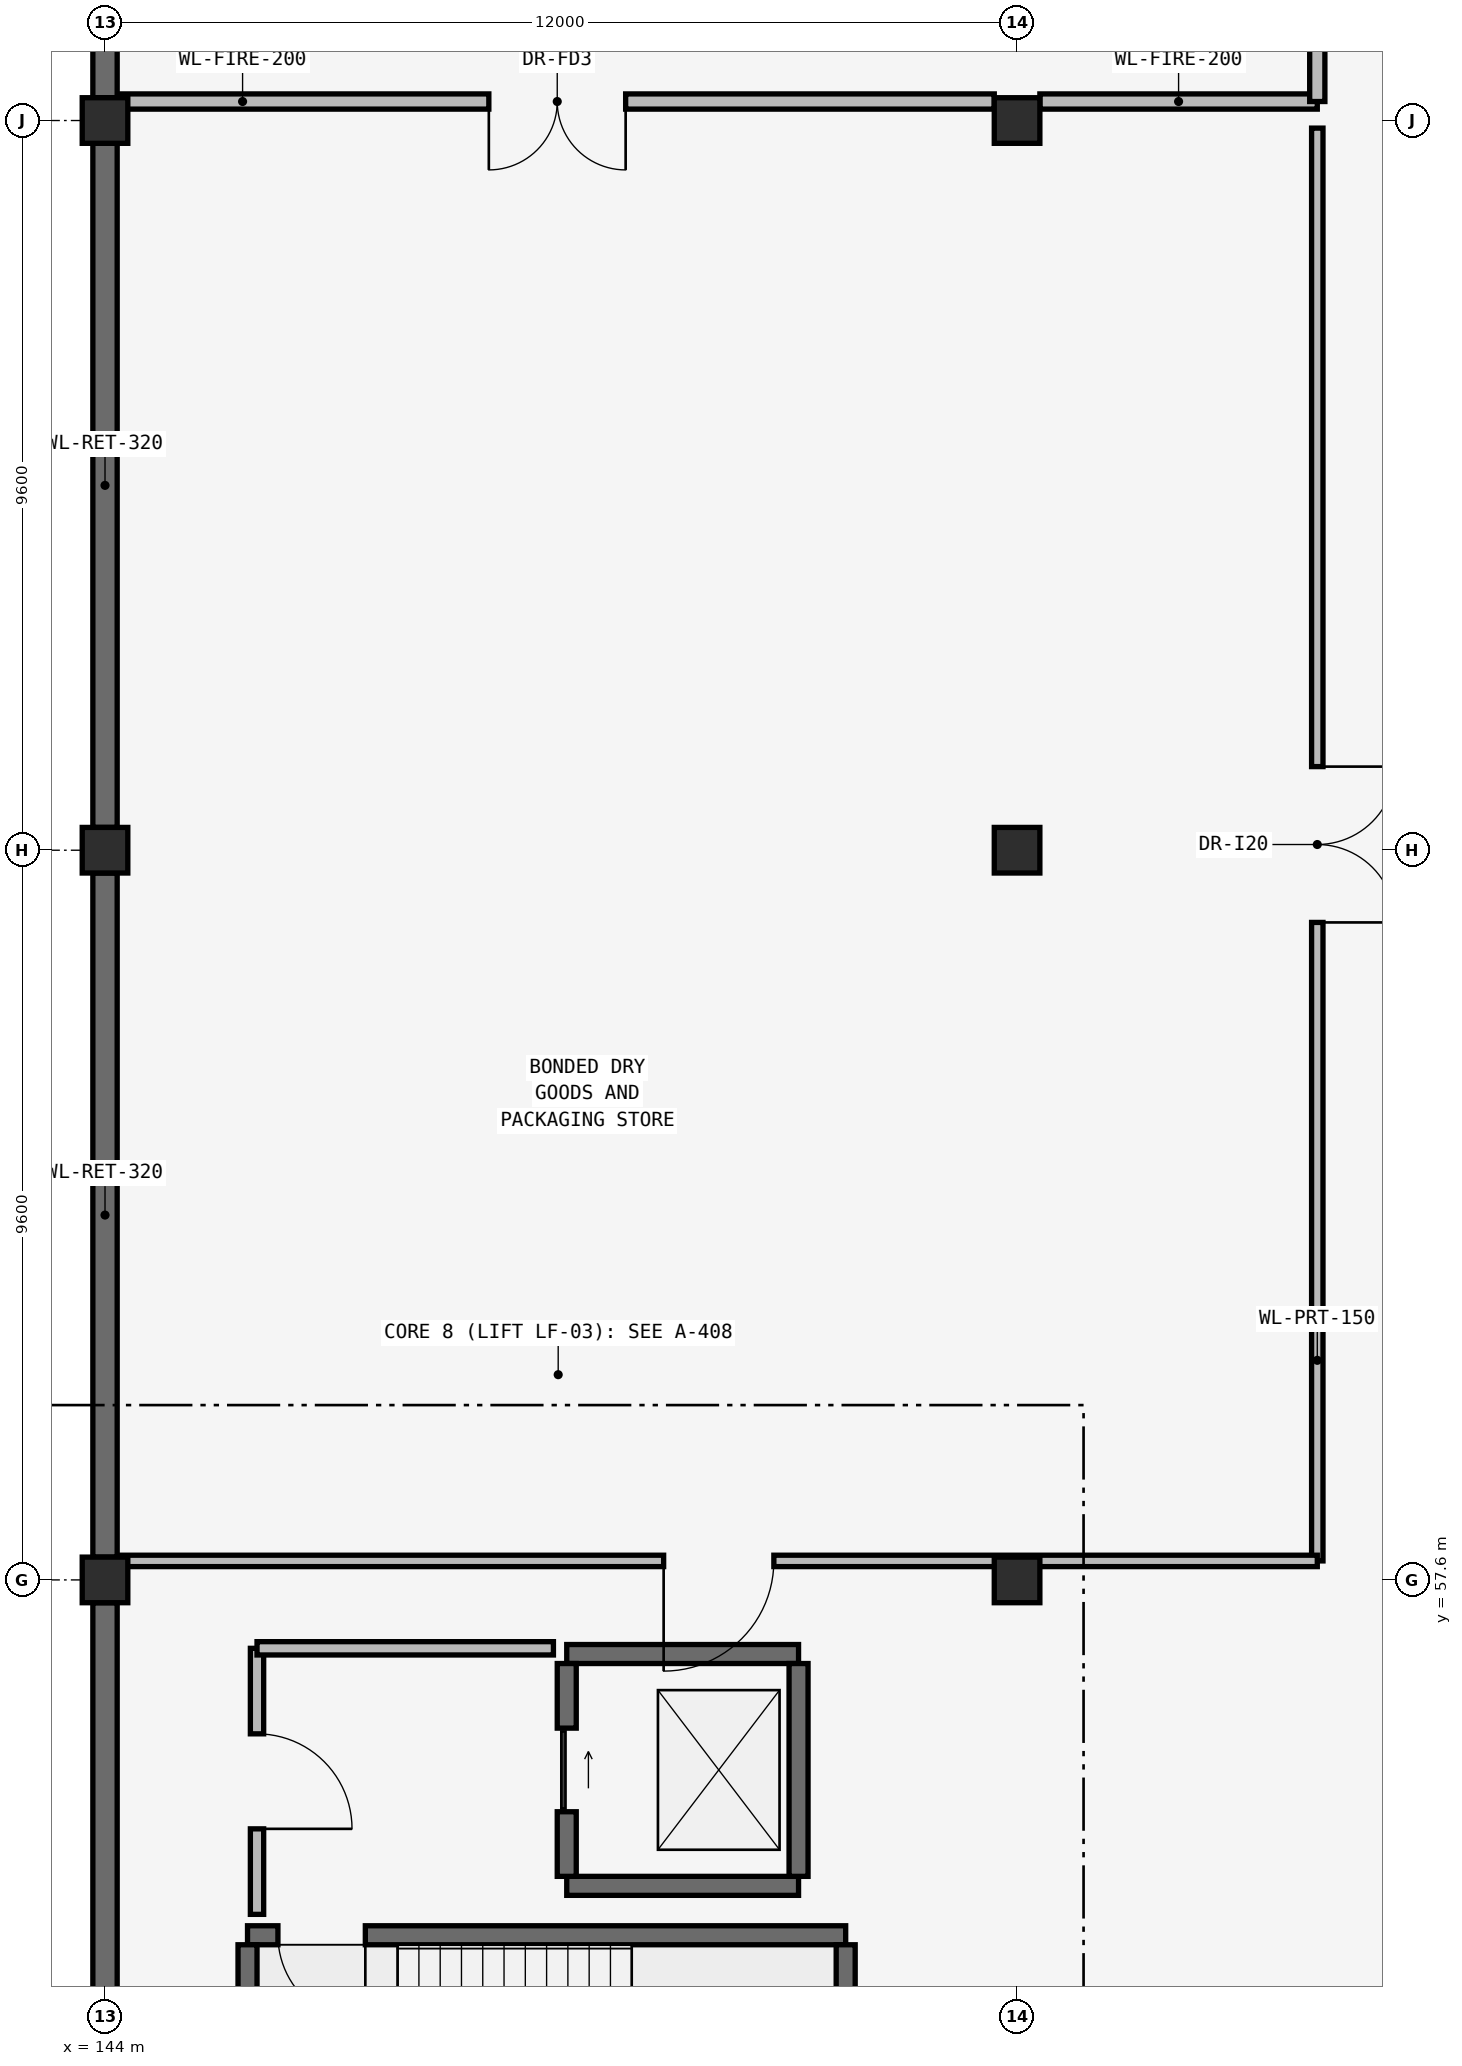
"""IFC4 building model, lengths in metres.
Left out: names, types, materials, properties, quantities, classifications, styles, units other than length and angle.
Written with IfcOpenShell. Run it as: python <this file> out.ifc"""

import sys

from ifc_helpers import new_model, si_unit, direction, frame, frame_2d, origin, origin_2d, place, context, subcontext, project, spatial, rectangle, extrude, element, fill, save


model = new_model("IFC4")
c1 = context("Model", 3, precision=1e-05, world=origin(), true_north=direction((0.0, 1.0)))
c2 = subcontext(c1, "Body", "Model", "MODEL_VIEW")
j1 = project(units=[si_unit("LENGTHUNIT", "METRE"), si_unit("PLANEANGLEUNIT", "RADIAN")], contexts=[c1])
p1 = place(None, origin())
s1 = spatial("IfcSite", under=j1, at=p1, CompositionType="ELEMENT")
p2 = place(p1, origin())
s2 = spatial("IfcBuilding", under=s1, at=p2, CompositionType="ELEMENT")
p3 = place(p2, frame((0.0, 0.0, -4.5)))
s3 = spatial("IfcBuildingStorey", under=s2, at=p3, CompositionType="ELEMENT", Elevation=-4.5)
for number, where, z_axis, x_axis in (
    (1, (144.0, 57.6, -0.35), (0.0, 0.0, 1.0), (1.0, 0.0, 0.0)),
    (2, (144.0, 67.2, -0.35), (0.0, 0.0, 1.0), (1.0, 0.0, 0.0)),
    (3, (144.0, 76.8, -0.35), (0.0, 0.0, 1.0), (1.0, 0.0, 0.0)),
    (4, (156.0, 57.6, -0.35), (0.0, 0.0, 1.0), (1.0, 0.0, 0.0)),
    (5, (156.0, 67.2, -0.35), (0.0, 0.0, 1.0), (1.0, 0.0, 0.0)),
    (6, (156.0, 76.8, -0.35), (0.0, 0.0, 1.0), (1.0, 0.0, 0.0)),
):
    element("IfcColumn", number, at=place(p3, frame(where, z_axis=z_axis, x_axis=x_axis)), inside=s3, PredefinedType="COLUMN", context=c2, shape_type="SweptSolid", body=[
        extrude(rectangle(XDim=0.6, YDim=0.6, at=origin_2d()), origin(), (0.0, 0.0, 1.0), 4.85),
    ])
for number, where, z_axis, x_axis in (
    (7, (144.0, 48.3, 0.0), (0.0, 0.0, 1.0), (0.0, 1.0, 0.0)),
    (8, (144.0, 57.9, 0.0), (0.0, 0.0, 1.0), (0.0, 1.0, 0.0)),
    (9, (144.0, 67.5, 0.0), (0.0, 0.0, 1.0), (0.0, 1.0, 0.0)),
    (10, (144.0, 77.1, 0.0), (0.0, 0.0, 1.0), (0.0, 1.0, 0.0)),
):
    element("IfcWall", number, at=place(p3, frame(where, z_axis=z_axis, x_axis=x_axis)), inside=s3, PredefinedType="USERDEFINED", context=c2, shape_type="SweptSolid", body=[
        extrude(rectangle(XDim=9.0, YDim=0.32, at=frame_2d((4.5, 0.0))), origin(), (0.0, 0.0, 1.0), 4.15),
    ])
p4 = place(p3, frame((145.875, 52.925, 0.0), z_axis=(0.0, 0.0, 1.0), x_axis=(1.0, 0.0, 0.0)))
e11 = element("IfcWall", 11, at=p4, inside=s3, PredefinedType="SHEAR", context=c2, shape_type="SweptSolid", body=[
    extrude(rectangle(XDim=7.87, YDim=0.25, at=frame_2d((3.935, 0.0))), origin(), (0.0, 0.0, 1.0), 4.15),
])
p5 = place(p4, frame((0.4, 0.0, 0.0)))
e12 = element("IfcOpeningElement", 12, at=p5, cuts=e11, PredefinedType="OPENING", context=c2, shape_type="SweptSolid", body=[
    extrude(rectangle(XDim=1.15, YDim=2.15, at=frame_2d((0.575, 1.075))), frame((0.0, 0.14, 0.0), z_axis=(0.0, -1.0, 0.0), x_axis=(1.0, 0.0, 0.0)), (0.0, 0.0, 1.0), 0.28),
])
for number, where, z_axis, x_axis in (
    (13, (145.875, 48.9, 0.0), (0.0, 0.0, 1.0), (0.0, 1.0, 0.0)),
    (14, (153.745, 48.9, 0.0), (0.0, 0.0, 1.0), (0.0, 1.0, 0.0)),
):
    element("IfcWall", number, at=place(p3, frame(where, z_axis=z_axis, x_axis=x_axis)), inside=s3, PredefinedType="SHEAR", context=c2, shape_type="SweptSolid", body=[
        extrude(rectangle(XDim=3.9, YDim=0.25, at=frame_2d((1.95, 0.0))), origin(), (0.0, 0.0, 1.0), 4.15),
    ])
for number, where, z_axis, x_axis in (
    (15, (150.075, 53.575, 0.0), (0.0, 0.0, 1.0), (1.0, 0.0, 0.0)),
    (16, (150.075, 56.625, 0.0), (0.0, 0.0, 1.0), (1.0, 0.0, 0.0)),
):
    element("IfcWall", number, at=place(p3, frame(where, z_axis=z_axis, x_axis=x_axis)), inside=s3, PredefinedType="SHEAR", context=c2, shape_type="SweptSolid", body=[
        extrude(rectangle(XDim=3.05, YDim=0.25, at=frame_2d((1.525, 0.0))), origin(), (0.0, 0.0, 1.0), 4.15),
    ])
p6 = place(p3, frame((153.125, 53.7, 0.0), z_axis=(0.0, 0.0, 1.0), x_axis=(0.0, 1.0, 0.0)))
e17 = element("IfcWall", 17, at=p6, inside=s3, PredefinedType="SHEAR", context=c2, shape_type="SweptSolid", body=[
    extrude(rectangle(XDim=2.8, YDim=0.25, at=frame_2d((1.4, 0.0))), origin(), (0.0, 0.0, 1.0), 4.15),
])
p7 = place(p3, frame((150.075, 53.7, 0.0), z_axis=(0.0, 0.0, 1.0), x_axis=(0.0, 1.0, 0.0)))
e18 = element("IfcWall", 18, at=p7, inside=s3, PredefinedType="SHEAR", context=c2, shape_type="SweptSolid", body=[
    extrude(rectangle(XDim=2.8, YDim=0.25, at=frame_2d((1.4, 0.0))), origin(), (0.0, 0.0, 1.0), 4.15),
])
p8 = place(p7, frame((0.85, 0.0, 0.0)))
e19 = element("IfcOpeningElement", 19, at=p8, cuts=e18, PredefinedType="OPENING", context=c2, shape_type="SweptSolid", body=[
    extrude(rectangle(XDim=1.1, YDim=2.15, at=frame_2d((0.55, 1.075))), frame((0.0, 0.14, 0.0), z_axis=(0.0, -1.0, 0.0), x_axis=(1.0, 0.0, 0.0)), (0.0, 0.0, 1.0), 0.28),
])
p9 = place(p3, frame((146.0, 53.2, 0.0), z_axis=(0.0, 0.0, 1.0), x_axis=(0.0, 1.0, 0.0)))
e20 = element("IfcWall", 20, at=p9, inside=s3, PredefinedType="PARTITIONING", context=c2, shape_type="SweptSolid", body=[
    extrude(rectangle(XDim=3.5, YDim=0.175, at=frame_2d((1.75, 0.0))), origin(), (0.0, 0.0, 1.0), 4.15),
])
p10 = place(p9, frame((1.125, 0.0, 0.0)))
e21 = element("IfcOpeningElement", 21, at=p10, cuts=e20, PredefinedType="OPENING", context=c2, shape_type="SweptSolid", body=[
    extrude(rectangle(XDim=1.25, YDim=2.2, at=frame_2d((0.625, 1.1))), frame((0.0, 0.103, 0.0), z_axis=(0.0, -1.0, 0.0), x_axis=(1.0, 0.0, 0.0)), (0.0, 0.0, 1.0), 0.205),
])
p11 = place(p3, frame((146.0, 56.7, 0.0), z_axis=(0.0, 0.0, 1.0), x_axis=(1.0, 0.0, 0.0)))
e22 = element("IfcWall", 22, at=p11, inside=s3, PredefinedType="PARTITIONING", context=c2, shape_type="SweptSolid", body=[
    extrude(rectangle(XDim=3.9, YDim=0.175, at=frame_2d((1.95, 0.0))), origin(), (0.0, 0.0, 1.0), 4.15),
])
p12 = place(p3, frame((144.2, 77.05, 0.0), z_axis=(0.0, 0.0, 1.0), x_axis=(1.0, 0.0, 0.0)))
e23 = element("IfcWall", 23, at=p12, inside=s3, PredefinedType="SOLIDWALL", context=c2, shape_type="SweptSolid", body=[
    extrude(rectangle(XDim=11.5, YDim=0.2, at=frame_2d((5.75, 0.0))), origin(), (0.0, 0.0, 1.0), 3.39),
])
p13 = place(p12, frame((4.85, 0.0, 0.0)))
e24 = element("IfcOpeningElement", 24, at=p13, cuts=e23, PredefinedType="OPENING", context=c2, shape_type="SweptSolid", body=[
    extrude(rectangle(XDim=1.8, YDim=2.2, at=frame_2d((0.9, 1.1))), frame((0.0, 0.115, 0.0), z_axis=(0.0, -1.0, 0.0), x_axis=(1.0, 0.0, 0.0)), (0.0, 0.0, 1.0), 0.23),
])
p14 = place(p3, frame((156.3, 77.05, 0.0), z_axis=(0.0, 0.0, 1.0), x_axis=(1.0, 0.0, 0.0)))
e25 = element("IfcWall", 25, at=p14, inside=s3, PredefinedType="SOLIDWALL", context=c2, shape_type="SweptSolid", body=[
    extrude(rectangle(XDim=3.65, YDim=0.2, at=frame_2d((1.825, 0.0))), origin(), (0.0, 0.0, 1.0), 3.39),
])
p15 = place(p3, frame((159.95, 57.85, 0.0), z_axis=(0.0, 0.0, 1.0), x_axis=(0.0, 1.0, 0.0)))
e26 = element("IfcWall", 26, at=p15, inside=s3, PredefinedType="PARTITIONING", context=c2, shape_type="SweptSolid", body=[
    extrude(rectangle(XDim=18.85, YDim=0.15, at=frame_2d((9.425, 0.0))), origin(), (0.0, 0.0, 1.0), 4.15),
])
p16 = place(p15, frame((8.4, 0.0, 0.0)))
e27 = element("IfcOpeningElement", 27, at=p16, cuts=e26, PredefinedType="OPENING", context=c2, shape_type="SweptSolid", body=[
    extrude(rectangle(XDim=2.05, YDim=2.25, at=frame_2d((1.025, 1.125))), frame((0.0, 0.09, 0.0), z_axis=(0.0, -1.0, 0.0), x_axis=(1.0, 0.0, 0.0)), (0.0, 0.0, 1.0), 0.18),
])
p17 = place(p3, frame((159.95, 77.05, 0.0), z_axis=(0.0, 0.0, 1.0), x_axis=(0.0, 1.0, 0.0)))
e28 = element("IfcWall", 28, at=p17, inside=s3, PredefinedType="SOLIDWALL", context=c2, shape_type="SweptSolid", body=[
    extrude(rectangle(XDim=18.75, YDim=0.2, at=frame_2d((9.375, 0.0))), origin(), (0.0, 0.0, 1.0), 4.15),
])
p18 = place(p17, frame((8.475, 0.0, 0.0)))
e29 = element("IfcOpeningElement", 29, at=p18, cuts=e28, PredefinedType="OPENING", context=c2, shape_type="SweptSolid", body=[
    extrude(rectangle(XDim=1.8, YDim=2.2, at=frame_2d((0.9, 1.1))), frame((0.0, 0.115, 0.0), z_axis=(0.0, -1.0, 0.0), x_axis=(1.0, 0.0, 0.0)), (0.0, 0.0, 1.0), 0.23),
])
p19 = place(p3, frame((144.2, 57.85, 0.0), z_axis=(0.0, 0.0, 1.0), x_axis=(1.0, 0.0, 0.0)))
e30 = element("IfcWall", 30, at=p19, inside=s3, PredefinedType="PARTITIONING", context=c2, shape_type="SweptSolid", body=[
    extrude(rectangle(XDim=15.75, YDim=0.15, at=frame_2d((7.875, 0.0))), origin(), (0.0, 0.0, 1.0), 3.39),
])
p20 = place(p19, frame((7.15, 0.0, 0.0)))
e31 = element("IfcOpeningElement", 31, at=p20, cuts=e30, PredefinedType="OPENING", context=c2, shape_type="SweptSolid", body=[
    extrude(rectangle(XDim=1.45, YDim=2.15, at=frame_2d((0.725, 1.075))), frame((0.0, 0.09, 0.0), z_axis=(0.0, -1.0, 0.0), x_axis=(1.0, 0.0, 0.0)), (0.0, 0.0, 1.0), 0.18),
])
p21 = place(p5, frame((1.15, 0.0, 0.0), z_axis=(0.0, 0.0, 1.0), x_axis=(-1.0, 0.0, 0.0)))
e32 = element("IfcDoor", 32, at=p21, inside=s3, OperationType="SINGLE_SWING_RIGHT", PredefinedType="DOOR", context=c2, shape_type="SweptSolid", body=[
    extrude(rectangle(XDim=1.15, YDim=2.15, at=frame_2d((0.575, 1.075))), frame((0.0, 0.025, 0.0), z_axis=(0.0, -1.0, 0.0), x_axis=(1.0, 0.0, 0.0)), (0.0, 0.0, 1.0), 0.05),
])
fill(e12, e32)
p22 = place(p8, origin())
e33 = element("IfcDoor", 33, at=p22, inside=s3, OperationType="SLIDING_TO_LEFT", PredefinedType="DOOR", context=c2, shape_type="SweptSolid", body=[
    extrude(rectangle(XDim=1.1, YDim=2.15, at=frame_2d((0.55, 1.075))), frame((0.0, 0.025, 0.0), z_axis=(0.0, -1.0, 0.0), x_axis=(1.0, 0.0, 0.0)), (0.0, 0.0, 1.0), 0.05),
])
fill(e19, e33)
p23 = place(p10, frame((1.25, 0.0, 0.0), z_axis=(0.0, 0.0, 1.0), x_axis=(-1.0, 0.0, 0.0)))
e34 = element("IfcDoor", 34, at=p23, inside=s3, OperationType="SINGLE_SWING_LEFT", PredefinedType="DOOR", context=c2, shape_type="SweptSolid", body=[
    extrude(rectangle(XDim=1.25, YDim=2.2, at=frame_2d((0.625, 1.1))), frame((0.0, 0.025, 0.0), z_axis=(0.0, -1.0, 0.0), x_axis=(1.0, 0.0, 0.0)), (0.0, 0.0, 1.0), 0.05),
])
fill(e21, e34)
p24 = place(p13, origin())
e35 = element("IfcDoor", 35, at=p24, inside=s3, OperationType="DOUBLE_DOOR_SINGLE_SWING", PredefinedType="DOOR", context=c2, shape_type="SweptSolid", body=[
    extrude(rectangle(XDim=1.8, YDim=2.2, at=frame_2d((0.9, 1.1))), frame((0.0, 0.025, 0.0), z_axis=(0.0, -1.0, 0.0), x_axis=(1.0, 0.0, 0.0)), (0.0, 0.0, 1.0), 0.05),
])
fill(e24, e35)
p25 = place(p16, origin())
e36 = element("IfcDoor", 36, at=p25, inside=s3, OperationType="DOUBLE_DOOR_SINGLE_SWING", PredefinedType="DOOR", context=c2, shape_type="SweptSolid", body=[
    extrude(rectangle(XDim=2.05, YDim=2.25, at=frame_2d((1.025, 1.125))), frame((0.0, 0.025, 0.0), z_axis=(0.0, -1.0, 0.0), x_axis=(1.0, 0.0, 0.0)), (0.0, 0.0, 1.0), 0.05),
])
fill(e27, e36)
p26 = place(p20, origin())
e37 = element("IfcDoor", 37, at=p26, inside=s3, OperationType="SINGLE_SWING_LEFT", PredefinedType="DOOR", context=c2, shape_type="SweptSolid", body=[
    extrude(rectangle(XDim=1.45, YDim=2.15, at=frame_2d((0.725, 1.075))), frame((0.0, 0.025, 0.0), z_axis=(0.0, -1.0, 0.0), x_axis=(1.0, 0.0, 0.0)), (0.0, 0.0, 1.0), 0.05),
])
fill(e31, e37)
save(model, sys.argv[1])
